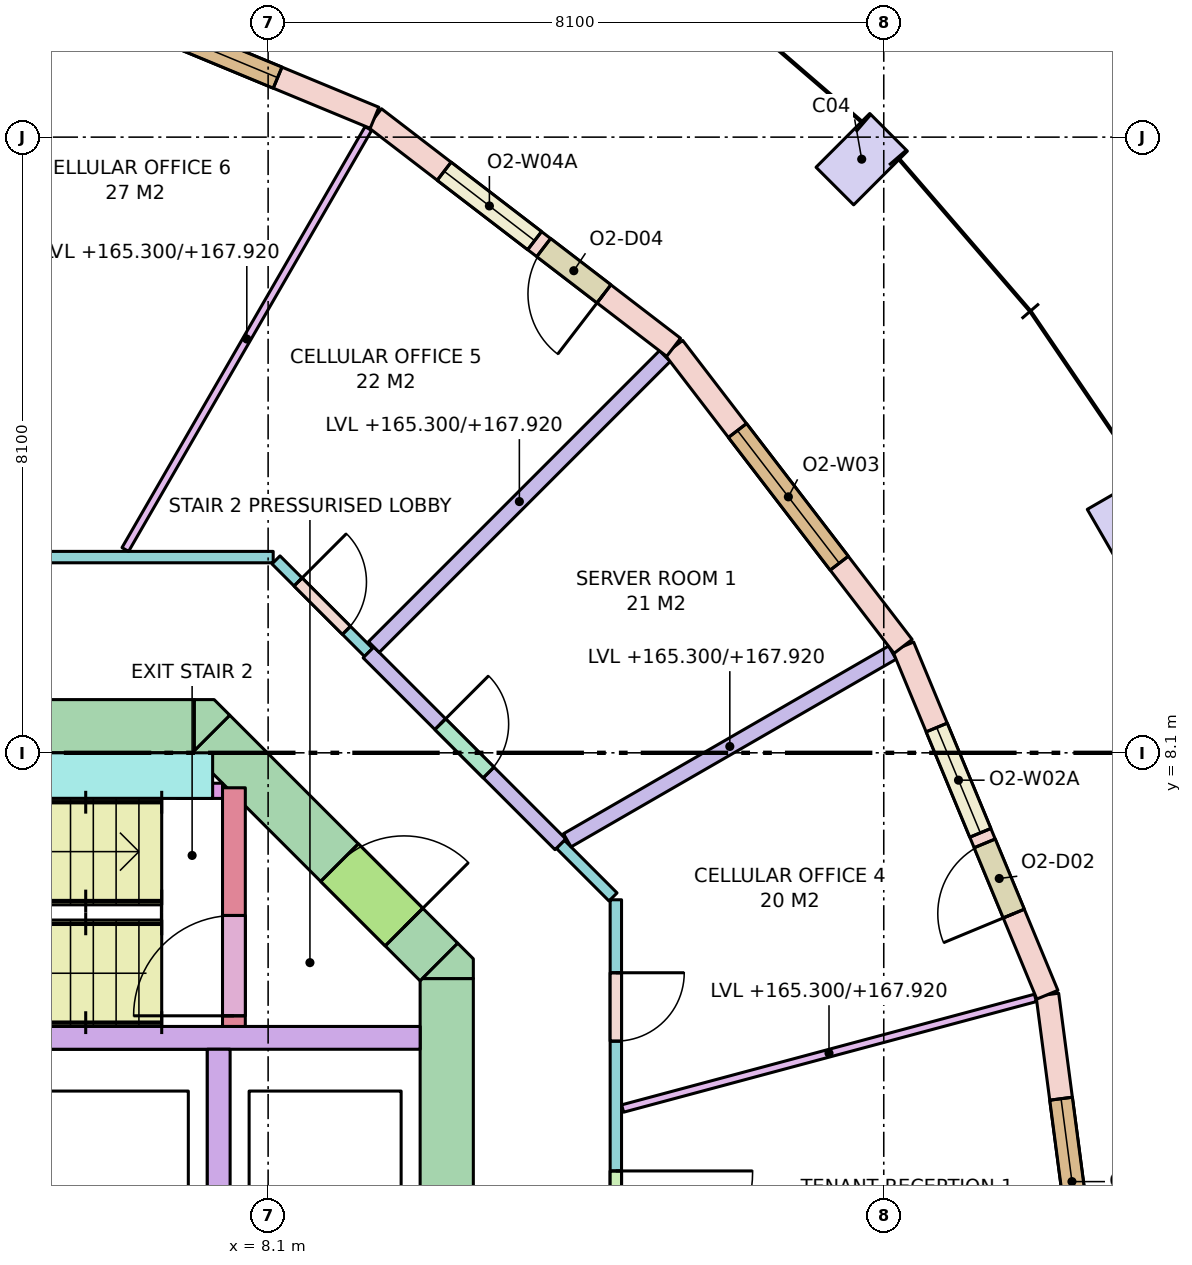
"""IFC4 building model, lengths in metres.
Left out: names, types, materials, properties, quantities, classifications, styles, units other than length and angle.
Written with IfcOpenShell. Run it as: python <this file> out.ifc"""

import sys

from ifc_helpers import new_model, si_unit, direction, frame, frame_2d, origin, origin_2d, place, context, subcontext, project, spatial, polyline, rectangle, outline, extrude, element, fill, save


model = new_model("IFC4")
c1 = context("Model", 3, precision=1e-05, world=origin(), true_north=direction((0.0, 1.0)))
c2 = subcontext(c1, "Body", "Model", "MODEL_VIEW")
j1 = project(units=[si_unit("LENGTHUNIT", "METRE"), si_unit("PLANEANGLEUNIT", "RADIAN")], contexts=[c1])
p1 = place(None, origin())
s1 = spatial("IfcSite", under=j1, at=p1, CompositionType="ELEMENT")
p2 = place(p1, origin())
s2 = spatial("IfcBuilding", under=s1, at=p2, CompositionType="ELEMENT")
p3 = place(p2, frame((0.0, 0.0, 165.3)))
s3 = spatial("IfcBuildingStorey", under=s2, at=p3, CompositionType="ELEMENT", Elevation=165.3)
for number, where, z_axis, x_axis in (
    (1, (19.486, 11.25, 0.0), (0.0, 0.0, 1.0), (-0.5, 0.866, 0.0)),
    (2, (15.91, 15.91, 0.0), (0.0, 0.0, 1.0), (-0.707, 0.707, 0.0)),
):
    element("IfcColumn", number, at=place(p3, frame(where, z_axis=z_axis, x_axis=x_axis)), inside=s3, PredefinedType="COLUMN", context=c2, shape_type="SweptSolid", body=[
        extrude(rectangle(XDim=0.7, YDim=1.0, at=origin_2d()), origin(), (0.0, 0.0, 1.0), 3.7),
    ])
p4 = place(p3, frame((-7.13, 8.45, -0.28), z_axis=(0.0, 0.0, 1.0), x_axis=(1.0, 0.0, 0.0)))
e3 = element("IfcWall", 3, at=p4, inside=s3, PredefinedType="SHEAR", context=c2, shape_type="SweptSolid", body=[
    extrude(rectangle(XDim=14.26, YDim=0.7, at=frame_2d((7.13, 0.0))), origin(), (0.0, 0.0, 1.0), 3.7),
])
p5 = place(p4, frame((5.48, 0.0, 0.28)))
e4 = element("IfcOpeningElement", 4, at=p5, cuts=e3, PredefinedType="OPENING", context=c2, shape_type="SweptSolid", body=[
    extrude(rectangle(XDim=0.7, YDim=2.1, at=frame_2d((0.35, 1.05))), frame((0.0, 0.36, 0.0), z_axis=(0.0, -1.0, 0.0), x_axis=(1.0, 0.0, 0.0)), (0.0, 0.0, 1.0), 0.72),
])
p6 = place(p4, frame((7.155, 0.0, 0.28)))
e5 = element("IfcOpeningElement", 5, at=p6, cuts=e3, PredefinedType="OPENING", context=c2, shape_type="SweptSolid", body=[
    extrude(rectangle(XDim=0.9, YDim=2.1, at=frame_2d((0.45, 1.05))), frame((0.0, 0.36, 0.0), z_axis=(0.0, -1.0, 0.0), x_axis=(1.0, 0.0, 0.0)), (0.0, 0.0, 1.0), 0.72),
])
p7 = place(p3, frame((10.45, -5.13, -0.28), z_axis=(0.0, 0.0, 1.0), x_axis=(0.0, 1.0, 0.0)))
e6 = element("IfcWall", 6, at=p7, inside=s3, PredefinedType="SHEAR", context=c2, shape_type="SweptSolid", body=[
    extrude(rectangle(XDim=10.26, YDim=0.7, at=frame_2d((5.13, 0.0))), origin(), (0.0, 0.0, 1.0), 3.7),
])
p8 = place(p7, frame((4.13, 0.0, 0.28)))
e7 = element("IfcOpeningElement", 7, at=p8, cuts=e6, PredefinedType="OPENING", context=c2, shape_type="SweptSolid", body=[
    extrude(rectangle(XDim=2.0, YDim=2.1, at=frame_2d((1.0, 1.05))), frame((0.0, 0.36, 0.0), z_axis=(0.0, -1.0, 0.0), x_axis=(1.0, 0.0, 0.0)), (0.0, 0.0, 1.0), 0.72),
])
p9 = place(p3, frame((7.347, 8.347, -0.28), z_axis=(0.0, 0.0, 1.0), x_axis=(0.707106781187, -0.707106781187, 0.0)))
e8 = element("IfcWall", 8, at=p9, inside=s3, PredefinedType="SHEAR", context=c2, shape_type="SweptSolid", body=[
    extrude(rectangle(XDim=4.243, YDim=0.7, at=frame_2d((2.121, 0.0))), origin(), (0.0, 0.0, 1.0), 3.7),
])
p10 = place(p9, frame((2.393, 0.0, 0.28)))
e9 = element("IfcOpeningElement", 9, at=p10, cuts=e8, PredefinedType="OPENING", context=c2, shape_type="SweptSolid", body=[
    extrude(rectangle(XDim=1.2, YDim=2.1, at=frame_2d((0.6, 1.05))), frame((0.0, 0.36, 0.0), z_axis=(0.0, -1.0, 0.0), x_axis=(1.0, 0.0, 0.0)), (0.0, 0.0, 1.0), 0.72),
])
p11 = place(p3, frame((0.0, 0.0, -0.28)))
e10 = element("IfcWall", 10, at=p11, inside=s3, PredefinedType="SHEAR", context=c2, shape_type="SweptSolid", body=[
    extrude(outline(polyline([(10.8, 5.39), (10.8, 5.13), (10.8, 5.13), (10.13, 5.13), (10.595, 5.595), (10.595, 5.595), (10.595, 5.595), (10.8, 5.39)])), origin(), (0.0, 0.0, 1.0), 3.7),
])
p12 = place(p3, frame((0.0, 0.0, -0.28)))
e11 = element("IfcWall", 11, at=p12, inside=s3, PredefinedType="SHEAR", context=c2, shape_type="SweptSolid", body=[
    extrude(outline(polyline([(7.39, 8.8), (7.595, 8.595), (7.595, 8.595), (7.595, 8.595), (7.13, 8.13), (7.13, 8.8), (7.13, 8.8), (7.39, 8.8)])), origin(), (0.0, 0.0, 1.0), 3.7),
])
p13 = place(p3, frame((2.0, 4.35, 0.0), z_axis=(0.0, 0.0, 1.0), x_axis=(1.0, 0.0, 0.0)))
e12 = element("IfcWall", 12, at=p13, inside=s3, PredefinedType="SOLIDWALL", context=c2, shape_type="SweptSolid", body=[
    extrude(rectangle(XDim=8.1, YDim=0.3, at=frame_2d((4.05, 0.0))), origin(), (0.0, 0.0, 1.0), 3.42),
])
p14 = place(p3, frame((7.45, 1.8, 0.0), z_axis=(0.0, 0.0, 1.0), x_axis=(0.0, 1.0, 0.0)))
e13 = element("IfcWall", 13, at=p14, inside=s3, PredefinedType="SOLIDWALL", context=c2, shape_type="SweptSolid", body=[
    extrude(rectangle(XDim=2.4, YDim=0.3, at=frame_2d((1.2, 0.0))), origin(), (0.0, 0.0, 1.0), 3.42),
])
p15 = place(p3, frame((7.65, 4.5, 0.0), z_axis=(0.0, 0.0, 1.0), x_axis=(0.0, 1.0, 0.0)))
e14 = element("IfcWall", 14, at=p15, inside=s3, PredefinedType="SHEAR", context=c2, shape_type="SweptSolid", body=[
    extrude(rectangle(XDim=3.14, YDim=0.3, at=frame_2d((1.57, 0.0))), origin(), (0.0, 0.0, 1.0), 3.42),
])
p16 = place(p15, frame((0.14, 0.0, 0.0)))
e15 = element("IfcOpeningElement", 15, at=p16, cuts=e14, PredefinedType="OPENING", context=c2, shape_type="SweptSolid", body=[
    extrude(rectangle(XDim=1.32, YDim=2.1, at=frame_2d((0.66, 1.05))), frame((0.0, 0.16, 0.0), z_axis=(0.0, -1.0, 0.0), x_axis=(1.0, 0.0, 0.0)), (0.0, 0.0, 1.0), 0.32),
])
p17 = place(p3, frame((2.0, 7.8, 0.0), z_axis=(0.0, 0.0, 1.0), x_axis=(1.0, 0.0, 0.0)))
e16 = element("IfcWall", 16, at=p17, inside=s3, PredefinedType="SHEAR", context=c2, shape_type="SweptSolid", body=[
    extrude(rectangle(XDim=5.37, YDim=0.6, at=frame_2d((2.685, 0.0))), origin(), (0.0, 0.0, 1.0), 3.42),
])
p18 = place(p3, frame((6.9, 7.6, 0.0), z_axis=(0.0, 0.0, 1.0), x_axis=(1.0, 0.0, 0.0)))
e17 = element("IfcWall", 17, at=p18, inside=s3, PredefinedType="SHEAR", context=c2, shape_type="SweptSolid", body=[
    extrude(rectangle(XDim=0.6, YDim=0.2, at=frame_2d((0.3, 0.0))), origin(), (0.0, 0.0, 1.0), 3.42),
])
p19 = place(p3, frame((19.0, 0.0, 0.0), z_axis=(0.0, 0.0, 1.0), x_axis=(-0.130538549191, 0.991443234469, 0.0)))
e18 = element("IfcWall", 18, at=p19, inside=s3, PredefinedType="STANDARD", context=c2, shape_type="SweptSolid", body=[
    extrude(rectangle(XDim=4.96, YDim=0.3, at=frame_2d((2.48, 0.0))), origin(), (0.0, 0.0, 1.0), 3.42),
])
p20 = place(p19, frame((1.38, 0.0, 0.8)))
e19 = element("IfcOpeningElement", 19, at=p20, cuts=e18, PredefinedType="OPENING", context=c2, shape_type="SweptSolid", body=[
    extrude(rectangle(XDim=2.2, YDim=2.4, at=frame_2d((1.1, 1.2))), frame((0.0, 0.16, 0.0), z_axis=(0.0, -1.0, 0.0), x_axis=(1.0, 0.0, 0.0)), (0.0, 0.0, 1.0), 0.32),
])
p21 = place(p3, frame((18.353, 4.917, 0.0), z_axis=(0.0, 0.0, 1.0), x_axis=(-0.382650301762, 0.923893254961, 0.0)))
e20 = element("IfcWall", 20, at=p21, inside=s3, PredefinedType="STANDARD", context=c2, shape_type="SweptSolid", body=[
    extrude(rectangle(XDim=4.96, YDim=0.3, at=frame_2d((2.48, 0.0))), origin(), (0.0, 0.0, 1.0), 3.42),
])
p22 = place(p21, frame((1.155, 0.0, 0.0)))
e21 = element("IfcOpeningElement", 21, at=p22, cuts=e20, PredefinedType="OPENING", context=c2, shape_type="SweptSolid", body=[
    extrude(rectangle(XDim=1.0, YDim=2.4, at=frame_2d((0.5, 1.2))), frame((0.0, 0.16, 0.0), z_axis=(0.0, -1.0, 0.0), x_axis=(1.0, 0.0, 0.0)), (0.0, 0.0, 1.0), 0.32),
])
p23 = place(p21, frame((2.305, 0.0, 0.8)))
e22 = element("IfcOpeningElement", 22, at=p23, cuts=e20, PredefinedType="OPENING", context=c2, shape_type="SweptSolid", body=[
    extrude(rectangle(XDim=1.5, YDim=2.4, at=frame_2d((0.75, 1.2))), frame((0.0, 0.16, 0.0), z_axis=(0.0, -1.0, 0.0), x_axis=(1.0, 0.0, 0.0)), (0.0, 0.0, 1.0), 0.32),
])
p24 = place(p3, frame((16.455, 9.5, 0.0), z_axis=(0.0, 0.0, 1.0), x_axis=(-0.608768356425, 0.793348024649, 0.0)))
e23 = element("IfcWall", 23, at=p24, inside=s3, PredefinedType="STANDARD", context=c2, shape_type="SweptSolid", body=[
    extrude(rectangle(XDim=4.96, YDim=0.3, at=frame_2d((2.48, 0.0))), origin(), (0.0, 0.0, 1.0), 3.42),
])
p25 = place(p24, frame((1.38, 0.0, 0.8)))
e24 = element("IfcOpeningElement", 24, at=p25, cuts=e23, PredefinedType="OPENING", context=c2, shape_type="SweptSolid", body=[
    extrude(rectangle(XDim=2.2, YDim=2.4, at=frame_2d((1.1, 1.2))), frame((0.0, 0.16, 0.0), z_axis=(0.0, -1.0, 0.0), x_axis=(1.0, 0.0, 0.0)), (0.0, 0.0, 1.0), 0.32),
])
p26 = place(p3, frame((13.435, 13.435, 0.0), z_axis=(0.0, 0.0, 1.0), x_axis=(-0.793348024649, 0.608768356425, 0.0)))
e25 = element("IfcWall", 25, at=p26, inside=s3, PredefinedType="STANDARD", context=c2, shape_type="SweptSolid", body=[
    extrude(rectangle(XDim=4.96, YDim=0.3, at=frame_2d((2.48, 0.0))), origin(), (0.0, 0.0, 1.0), 3.42),
])
p27 = place(p26, frame((1.155, 0.0, 0.0)))
e26 = element("IfcOpeningElement", 26, at=p27, cuts=e25, PredefinedType="OPENING", context=c2, shape_type="SweptSolid", body=[
    extrude(rectangle(XDim=1.0, YDim=2.4, at=frame_2d((0.5, 1.2))), frame((0.0, 0.16, 0.0), z_axis=(0.0, -1.0, 0.0), x_axis=(1.0, 0.0, 0.0)), (0.0, 0.0, 1.0), 0.32),
])
p28 = place(p26, frame((2.305, 0.0, 0.8)))
e27 = element("IfcOpeningElement", 27, at=p28, cuts=e25, PredefinedType="OPENING", context=c2, shape_type="SweptSolid", body=[
    extrude(rectangle(XDim=1.5, YDim=2.4, at=frame_2d((0.75, 1.2))), frame((0.0, 0.16, 0.0), z_axis=(0.0, -1.0, 0.0), x_axis=(1.0, 0.0, 0.0)), (0.0, 0.0, 1.0), 0.32),
])
p29 = place(p3, frame((9.5, 16.455, 0.0), z_axis=(0.0, 0.0, 1.0), x_axis=(-0.923893254961, 0.382650301762, 0.0)))
e28 = element("IfcWall", 28, at=p29, inside=s3, PredefinedType="STANDARD", context=c2, shape_type="SweptSolid", body=[
    extrude(rectangle(XDim=4.96, YDim=0.3, at=frame_2d((2.48, 0.0))), origin(), (0.0, 0.0, 1.0), 3.42),
])
p30 = place(p29, frame((1.38, 0.0, 0.8)))
e29 = element("IfcOpeningElement", 29, at=p30, cuts=e28, PredefinedType="OPENING", context=c2, shape_type="SweptSolid", body=[
    extrude(rectangle(XDim=2.2, YDim=2.4, at=frame_2d((1.1, 1.2))), frame((0.0, 0.16, 0.0), z_axis=(0.0, -1.0, 0.0), x_axis=(1.0, 0.0, 0.0)), (0.0, 0.0, 1.0), 0.32),
])
p31 = place(p3, frame((-8.167, 10.675, 0.0), z_axis=(0.0, 0.0, 1.0), x_axis=(1.0, 0.0, 0.0)))
e30 = element("IfcWall", 30, at=p31, inside=s3, PredefinedType="PARTITIONING", context=c2, shape_type="SweptSolid", body=[
    extrude(rectangle(XDim=16.333, YDim=0.15, at=frame_2d((8.167, 0.0))), origin(), (0.0, 0.0, 1.0), 2.62),
])
p32 = place(p31, frame((4.639, 0.0, 0.0)))
e31 = element("IfcOpeningElement", 31, at=p32, cuts=e30, PredefinedType="OPENING", context=c2, shape_type="SweptSolid", body=[
    extrude(rectangle(XDim=1.8, YDim=2.1, at=frame_2d((0.9, 1.05))), frame((0.0, 0.085, 0.0), z_axis=(0.0, -1.0, 0.0), x_axis=(1.0, 0.0, 0.0)), (0.0, 0.0, 1.0), 0.17),
])
p33 = place(p31, frame((12.232, 0.0, 0.0)))
e32 = element("IfcOpeningElement", 32, at=p33, cuts=e30, PredefinedType="OPENING", context=c2, shape_type="SweptSolid", body=[
    extrude(rectangle(XDim=0.9, YDim=2.1, at=frame_2d((0.45, 1.05))), frame((0.0, 0.085, 0.0), z_axis=(0.0, -1.0, 0.0), x_axis=(1.0, 0.0, 0.0)), (0.0, 0.0, 1.0), 0.17),
])
p34 = place(p3, frame((8.204, 10.638, 0.0), z_axis=(0.0, 0.0, 1.0), x_axis=(0.707177693966, -0.707035861295, 0.0)))
e33 = element("IfcWall", 33, at=p34, inside=s3, PredefinedType="PARTITIONING", context=c2, shape_type="SweptSolid", body=[
    extrude(rectangle(XDim=1.721, YDim=0.15, at=frame_2d((0.861, 0.0))), origin(), (0.0, 0.0, 1.0), 2.62),
])
p35 = place(p34, frame((0.411, 0.0, 0.0)))
e34 = element("IfcOpeningElement", 34, at=p35, cuts=e33, PredefinedType="OPENING", context=c2, shape_type="SweptSolid", body=[
    extrude(rectangle(XDim=0.9, YDim=2.1, at=frame_2d((0.45, 1.05))), frame((0.0, 0.085, 0.0), z_axis=(0.0, -1.0, 0.0), x_axis=(1.0, 0.0, 0.0)), (0.0, 0.0, 1.0), 0.17),
])
p36 = place(p3, frame((9.421, 9.421, 0.0), z_axis=(0.0, 0.0, 1.0), x_axis=(0.707072585922, -0.707140974798, 0.0)))
e35 = element("IfcWall", 35, at=p36, inside=s3, PredefinedType="PARTITIONING", context=c2, shape_type="SweptSolid", body=[
    extrude(rectangle(XDim=3.57, YDim=0.2, at=frame_2d((1.785, 0.0))), origin(), (0.0, 0.0, 1.0), 2.62),
])
p37 = place(p36, frame((1.335, 0.0, 0.0)))
e36 = element("IfcOpeningElement", 36, at=p37, cuts=e35, PredefinedType="OPENING", context=c2, shape_type="SweptSolid", body=[
    extrude(rectangle(XDim=0.9, YDim=2.1, at=frame_2d((0.45, 1.05))), frame((0.0, 0.11, 0.0), z_axis=(0.0, -1.0, 0.0), x_axis=(1.0, 0.0, 0.0)), (0.0, 0.0, 1.0), 0.22),
])
p38 = place(p3, frame((11.945, 6.896, 0.0), z_axis=(0.0, 0.0, 1.0), x_axis=(0.707106781187, -0.707106781187, 0.0)))
e37 = element("IfcWall", 37, at=p38, inside=s3, PredefinedType="PARTITIONING", context=c2, shape_type="SweptSolid", body=[
    extrude(rectangle(XDim=0.98, YDim=0.15, at=frame_2d((0.49, 0.0))), origin(), (0.0, 0.0, 1.0), 2.62),
])
p39 = place(p3, frame((12.675, 6.167, 0.0), z_axis=(0.0, 0.0, 1.0), x_axis=(0.0, -1.0, 0.0)))
e38 = element("IfcWall", 38, at=p39, inside=s3, PredefinedType="PARTITIONING", context=c2, shape_type="SweptSolid", body=[
    extrude(rectangle(XDim=12.333, YDim=0.15, at=frame_2d((6.167, 0.0))), origin(), (0.0, 0.0, 1.0), 2.62),
])
p40 = place(p39, frame((7.416, 0.0, 0.0)))
e39 = element("IfcOpeningElement", 39, at=p40, cuts=e38, PredefinedType="OPENING", context=c2, shape_type="SweptSolid", body=[
    extrude(rectangle(XDim=0.9, YDim=2.1, at=frame_2d((0.45, 1.05))), frame((0.0, 0.085, 0.0), z_axis=(0.0, -1.0, 0.0), x_axis=(1.0, 0.0, 0.0)), (0.0, 0.0, 1.0), 0.17),
])
p41 = place(p39, frame((3.568, 0.0, 0.0)))
e40 = element("IfcOpeningElement", 40, at=p41, cuts=e38, PredefinedType="OPENING", context=c2, shape_type="SweptSolid", body=[
    extrude(rectangle(XDim=1.8, YDim=2.1, at=frame_2d((0.9, 1.05))), frame((0.0, 0.085, 0.0), z_axis=(0.0, -1.0, 0.0), x_axis=(1.0, 0.0, 0.0)), (0.0, 0.0, 1.0), 0.17),
])
p42 = place(p39, frame((0.96, 0.0, 0.0)))
e41 = element("IfcOpeningElement", 41, at=p42, cuts=e38, PredefinedType="OPENING", context=c2, shape_type="SweptSolid", body=[
    extrude(rectangle(XDim=0.9, YDim=2.1, at=frame_2d((0.45, 1.05))), frame((0.0, 0.085, 0.0), z_axis=(0.0, -1.0, 0.0), x_axis=(1.0, 0.0, 0.0)), (0.0, 0.0, 1.0), 0.17),
])
p43 = place(p3, frame((12.764, 3.42, 0.0), z_axis=(0.0, 0.0, 1.0), x_axis=(0.965925759926, 0.258819292773, 0.0)))
e42 = element("IfcWall", 42, at=p43, inside=s3, PredefinedType="PARTITIONING", context=c2, shape_type="SweptSolid", body=[
    extrude(rectangle(XDim=5.622, YDim=0.1, at=frame_2d((2.811, 0.0))), origin(), (0.0, 0.0, 1.0), 2.62),
])
p44 = place(p3, frame((12.036, 6.949, 0.0), z_axis=(0.0, 0.0, 1.0), x_axis=(0.866016828037, 0.500014853336, 0.0)))
e43 = element("IfcWall", 43, at=p44, inside=s3, PredefinedType="PARTITIONING", context=c2, shape_type="SweptSolid", body=[
    extrude(rectangle(XDim=4.939, YDim=0.2, at=frame_2d((2.469, 0.0))), origin(), (0.0, 0.0, 1.0), 2.62),
])
p45 = place(p3, frame((9.491, 9.491, 0.0), z_axis=(0.0, 0.0, 1.0), x_axis=(0.707106781187, 0.707106781187, 0.0)))
e44 = element("IfcWall", 44, at=p45, inside=s3, PredefinedType="PARTITIONING", context=c2, shape_type="SweptSolid", body=[
    extrude(rectangle(XDim=5.414, YDim=0.2, at=frame_2d((2.707, 0.0))), origin(), (0.0, 0.0, 1.0), 2.62),
])
p46 = place(p3, frame((6.221, 10.775, 0.0), z_axis=(0.0, 0.0, 1.0), x_axis=(0.500023166934, 0.866012027936, 0.0)))
e45 = element("IfcWall", 45, at=p46, inside=s3, PredefinedType="PARTITIONING", context=c2, shape_type="SweptSolid", body=[
    extrude(rectangle(XDim=6.395, YDim=0.1, at=frame_2d((3.198, 0.0))), origin(), (0.0, 0.0, 1.0), 2.62),
])
p47 = place(p20, origin())
e46 = element("IfcWindow", 46, at=p47, inside=s3, PartitioningType="SINGLE_PANEL", PredefinedType="WINDOW", context=c2, shape_type="SweptSolid", body=[
    extrude(rectangle(XDim=2.2, YDim=2.4, at=frame_2d((1.1, 1.2))), frame((0.0, 0.03, 0.0), z_axis=(0.0, -1.0, 0.0), x_axis=(1.0, 0.0, 0.0)), (0.0, 0.0, 1.0), 0.06),
])
fill(e19, e46)
p48 = place(p22, origin())
e47 = element("IfcDoor", 47, at=p48, inside=s3, OperationType="SINGLE_SWING_LEFT", PredefinedType="DOOR", context=c2, shape_type="SweptSolid", body=[
    extrude(rectangle(XDim=1.0, YDim=2.4, at=frame_2d((0.5, 1.2))), frame((0.0, 0.025, 0.0), z_axis=(0.0, -1.0, 0.0), x_axis=(1.0, 0.0, 0.0)), (0.0, 0.0, 1.0), 0.05),
])
fill(e21, e47)
p49 = place(p23, origin())
e48 = element("IfcWindow", 48, at=p49, inside=s3, PartitioningType="SINGLE_PANEL", PredefinedType="WINDOW", context=c2, shape_type="SweptSolid", body=[
    extrude(rectangle(XDim=1.5, YDim=2.4, at=frame_2d((0.75, 1.2))), frame((0.0, 0.03, 0.0), z_axis=(0.0, -1.0, 0.0), x_axis=(1.0, 0.0, 0.0)), (0.0, 0.0, 1.0), 0.06),
])
fill(e22, e48)
p50 = place(p25, origin())
e49 = element("IfcWindow", 49, at=p50, inside=s3, PartitioningType="SINGLE_PANEL", PredefinedType="WINDOW", context=c2, shape_type="SweptSolid", body=[
    extrude(rectangle(XDim=2.2, YDim=2.4, at=frame_2d((1.1, 1.2))), frame((0.0, 0.03, 0.0), z_axis=(0.0, -1.0, 0.0), x_axis=(1.0, 0.0, 0.0)), (0.0, 0.0, 1.0), 0.06),
])
fill(e24, e49)
p51 = place(p27, origin())
e50 = element("IfcDoor", 50, at=p51, inside=s3, OperationType="SINGLE_SWING_LEFT", PredefinedType="DOOR", context=c2, shape_type="SweptSolid", body=[
    extrude(rectangle(XDim=1.0, YDim=2.4, at=frame_2d((0.5, 1.2))), frame((0.0, 0.025, 0.0), z_axis=(0.0, -1.0, 0.0), x_axis=(1.0, 0.0, 0.0)), (0.0, 0.0, 1.0), 0.05),
])
fill(e26, e50)
p52 = place(p28, origin())
e51 = element("IfcWindow", 51, at=p52, inside=s3, PartitioningType="SINGLE_PANEL", PredefinedType="WINDOW", context=c2, shape_type="SweptSolid", body=[
    extrude(rectangle(XDim=1.5, YDim=2.4, at=frame_2d((0.75, 1.2))), frame((0.0, 0.03, 0.0), z_axis=(0.0, -1.0, 0.0), x_axis=(1.0, 0.0, 0.0)), (0.0, 0.0, 1.0), 0.06),
])
fill(e27, e51)
p53 = place(p30, origin())
e52 = element("IfcWindow", 52, at=p53, inside=s3, PartitioningType="SINGLE_PANEL", PredefinedType="WINDOW", context=c2, shape_type="SweptSolid", body=[
    extrude(rectangle(XDim=2.2, YDim=2.4, at=frame_2d((1.1, 1.2))), frame((0.0, 0.03, 0.0), z_axis=(0.0, -1.0, 0.0), x_axis=(1.0, 0.0, 0.0)), (0.0, 0.0, 1.0), 0.06),
])
fill(e29, e52)
p54 = place(p16, origin())
e53 = element("IfcDoor", 53, at=p54, inside=s3, OperationType="DOUBLE_DOOR_SINGLE_SWING", PredefinedType="DOOR", context=c2, shape_type="SweptSolid", body=[
    extrude(rectangle(XDim=1.32, YDim=2.1, at=frame_2d((0.66, 1.05))), frame((0.0, 0.025, 0.0), z_axis=(0.0, -1.0, 0.0), x_axis=(1.0, 0.0, 0.0)), (0.0, 0.0, 1.0), 0.05),
])
fill(e15, e53)
p55 = place(p10, origin())
e54 = element("IfcDoor", 54, at=p55, inside=s3, OperationType="SINGLE_SWING_RIGHT", PredefinedType="DOOR", context=c2, shape_type="SweptSolid", body=[
    extrude(rectangle(XDim=1.2, YDim=2.1, at=frame_2d((0.6, 1.05))), frame((0.0, 0.025, 0.0), z_axis=(0.0, -1.0, 0.0), x_axis=(1.0, 0.0, 0.0)), (0.0, 0.0, 1.0), 0.05),
])
fill(e9, e54)
p56 = place(p41, origin())
e55 = element("IfcDoor", 55, at=p56, inside=s3, OperationType="DOUBLE_DOOR_SINGLE_SWING", PredefinedType="DOOR", context=c2, shape_type="SweptSolid", body=[
    extrude(rectangle(XDim=1.8, YDim=2.1, at=frame_2d((0.9, 1.05))), frame((0.0, 0.025, 0.0), z_axis=(0.0, -1.0, 0.0), x_axis=(1.0, 0.0, 0.0)), (0.0, 0.0, 1.0), 0.05),
])
fill(e40, e55)
p57 = place(p42, origin())
e56 = element("IfcDoor", 56, at=p57, inside=s3, OperationType="SINGLE_SWING_LEFT", PredefinedType="DOOR", context=c2, shape_type="SweptSolid", body=[
    extrude(rectangle(XDim=0.9, YDim=2.1, at=frame_2d((0.45, 1.05))), frame((0.0, 0.025, 0.0), z_axis=(0.0, -1.0, 0.0), x_axis=(1.0, 0.0, 0.0)), (0.0, 0.0, 1.0), 0.05),
])
fill(e41, e56)
p58 = place(p37, origin())
e57 = element("IfcDoor", 57, at=p58, inside=s3, OperationType="SINGLE_SWING_LEFT", PredefinedType="DOOR", context=c2, shape_type="SweptSolid", body=[
    extrude(rectangle(XDim=0.9, YDim=2.1, at=frame_2d((0.45, 1.05))), frame((0.0, 0.025, 0.0), z_axis=(0.0, -1.0, 0.0), x_axis=(1.0, 0.0, 0.0)), (0.0, 0.0, 1.0), 0.05),
])
fill(e36, e57)
p59 = place(p35, origin())
e58 = element("IfcDoor", 58, at=p59, inside=s3, OperationType="SINGLE_SWING_LEFT", PredefinedType="DOOR", context=c2, shape_type="SweptSolid", body=[
    extrude(rectangle(XDim=0.9, YDim=2.1, at=frame_2d((0.45, 1.05))), frame((0.0, 0.025, 0.0), z_axis=(0.0, -1.0, 0.0), x_axis=(1.0, 0.0, 0.0)), (0.0, 0.0, 1.0), 0.05),
])
fill(e34, e58)
save(model, sys.argv[1])
